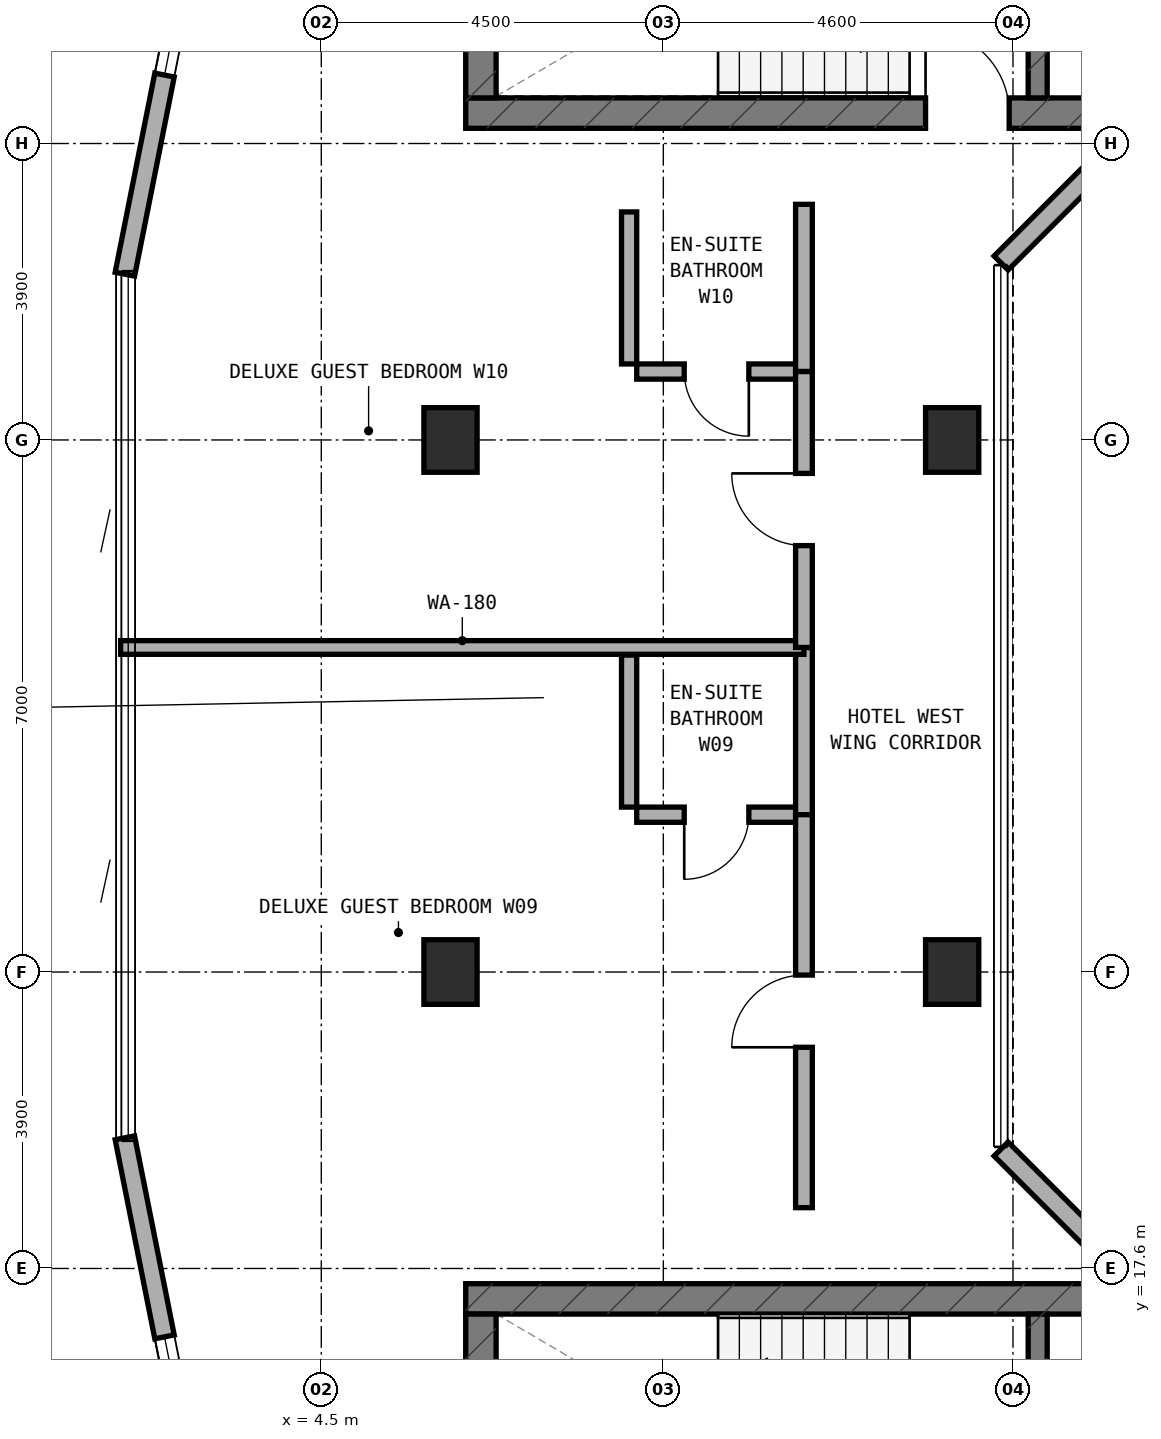
"""IFC4 building model, lengths in metres.
Left out: names, types, materials, properties, quantities, classifications, styles, units other than length and angle.
Written with IfcOpenShell. Run it as: python <this file> out.ifc"""

import sys

from ifc_helpers import new_model, si_unit, direction, frame, frame_2d, origin, origin_2d, place, context, subcontext, project, spatial, rectangle, extrude, element, fill, save


model = new_model("IFC4")
c1 = context("Model", 3, precision=1e-05, world=origin(), true_north=direction((0.0, 1.0)))
c2 = subcontext(c1, "Body", "Model", "MODEL_VIEW")
j1 = project(units=[si_unit("LENGTHUNIT", "METRE"), si_unit("PLANEANGLEUNIT", "RADIAN")], contexts=[c1])
p1 = place(None, origin())
s1 = spatial("IfcSite", under=j1, at=p1, CompositionType="ELEMENT")
p2 = place(p1, origin())
s2 = spatial("IfcBuilding", under=s1, at=p2, CompositionType="ELEMENT")
p3 = place(p2, frame((0.0, 0.0, 224.3)))
s3 = spatial("IfcBuildingStorey", under=s2, at=p3, CompositionType="ELEMENT", Elevation=224.3)
p4 = place(p3, frame((6.4, 32.8, 0.0), z_axis=(0.0, 0.0, 1.0), x_axis=(1.0, 0.0, 0.0)))
e1 = element("IfcWall", 1, at=p4, inside=s3, PredefinedType="SHEAR", context=c2, shape_type="SweptSolid", body=[
    extrude(rectangle(XDim=24.4, YDim=0.4, at=frame_2d((12.2, 0.0))), origin(), (0.0, 0.0, 1.0), 3.6),
])
p5 = place(p4, frame((6.05, 0.0, 0.0)))
e2 = element("IfcOpeningElement", 2, at=p5, cuts=e1, PredefinedType="OPENING", context=c2, shape_type="SweptSolid", body=[
    extrude(rectangle(XDim=1.1, YDim=2.15, at=frame_2d((0.55, 1.075))), frame((0.0, 0.21, 0.0), z_axis=(0.0, -1.0, 0.0), x_axis=(1.0, 0.0, 0.0)), (0.0, 0.0, 1.0), 0.42),
])
p6 = place(p3, frame((6.6, 33.0, 0.0), z_axis=(0.0, 0.0, 1.0), x_axis=(0.0, 1.0, 0.0)))
e3 = element("IfcWall", 3, at=p6, inside=s3, PredefinedType="SHEAR", context=c2, shape_type="SweptSolid", body=[
    extrude(rectangle(XDim=3.16, YDim=0.4, at=frame_2d((1.58, 0.0))), origin(), (0.0, 0.0, 1.0), 3.6),
])
p7 = place(p3, frame((13.925, 33.0, 0.0), z_axis=(0.0, 0.0, 1.0), x_axis=(0.0, 1.0, 0.0)))
e4 = element("IfcWall", 4, at=p7, inside=s3, PredefinedType="STANDARD", context=c2, shape_type="SweptSolid", body=[
    extrude(rectangle(XDim=3.16, YDim=0.25, at=frame_2d((1.58, 0.0))), origin(), (0.0, 0.0, 1.0), 3.32),
])
p8 = place(p7, frame((0.98, 0.0, 0.0)))
e5 = element("IfcOpeningElement", 5, at=p8, cuts=e4, PredefinedType="OPENING", context=c2, shape_type="SweptSolid", body=[
    extrude(rectangle(XDim=1.1, YDim=2.15, at=frame_2d((0.55, 1.075))), frame((0.0, 0.135, 0.0), z_axis=(0.0, -1.0, 0.0), x_axis=(1.0, 0.0, 0.0)), (0.0, 0.0, 1.0), 0.27),
])
p9 = place(p3, frame((6.4, 17.2, 0.0), z_axis=(0.0, 0.0, 1.0), x_axis=(1.0, 0.0, 0.0)))
e6 = element("IfcWall", 6, at=p9, inside=s3, PredefinedType="SHEAR", context=c2, shape_type="SweptSolid", body=[
    extrude(rectangle(XDim=24.4, YDim=0.4, at=frame_2d((12.2, 0.0))), origin(), (0.0, 0.0, 1.0), 3.6),
])
p10 = place(p3, frame((6.6, 13.84, 0.0), z_axis=(0.0, 0.0, 1.0), x_axis=(0.0, 1.0, 0.0)))
e7 = element("IfcWall", 7, at=p10, inside=s3, PredefinedType="SHEAR", context=c2, shape_type="SweptSolid", body=[
    extrude(rectangle(XDim=3.16, YDim=0.4, at=frame_2d((1.58, 0.0))), origin(), (0.0, 0.0, 1.0), 3.6),
])
p11 = place(p3, frame((13.925, 13.84, 0.0), z_axis=(0.0, 0.0, 1.0), x_axis=(0.0, 1.0, 0.0)))
e8 = element("IfcWall", 8, at=p11, inside=s3, PredefinedType="STANDARD", context=c2, shape_type="SweptSolid", body=[
    extrude(rectangle(XDim=3.16, YDim=0.25, at=frame_2d((1.58, 0.0))), origin(), (0.0, 0.0, 1.0), 3.32),
])
p12 = place(p11, frame((0.98, 0.0, 0.0)))
e9 = element("IfcOpeningElement", 9, at=p12, cuts=e8, PredefinedType="OPENING", context=c2, shape_type="SweptSolid", body=[
    extrude(rectangle(XDim=1.1, YDim=2.15, at=frame_2d((0.55, 1.075))), frame((0.0, 0.135, 0.0), z_axis=(0.0, -1.0, 0.0), x_axis=(1.0, 0.0, 0.0)), (0.0, 0.0, 1.0), 0.27),
])
for number, where, z_axis, x_axis in (
    (10, (6.2, 21.5, 0.0), (0.0, 0.0, 1.0), (1.0, 0.0, 0.0)),
    (11, (6.2, 28.5, 0.0), (0.0, 0.0, 1.0), (1.0, 0.0, 0.0)),
    (12, (12.8, 21.5, 0.0), (0.0, 0.0, 1.0), (1.0, 0.0, 0.0)),
    (13, (12.8, 28.5, 0.0), (0.0, 0.0, 1.0), (1.0, 0.0, 0.0)),
):
    element("IfcColumn", number, at=place(p3, frame(where, z_axis=z_axis, x_axis=x_axis)), inside=s3, PredefinedType="COLUMN", context=c2, shape_type="SweptSolid", body=[
        extrude(rectangle(XDim=0.7, YDim=0.85, at=origin_2d()), origin(), (0.0, 0.0, 1.0), 3.6),
    ])
p13 = place(p3, frame((3.629, 39.283, 0.0), z_axis=(0.0, 0.0, 1.0), x_axis=(-0.195291715883, -0.980745199176, 0.0)))
e14 = element("IfcWall", 14, at=p13, inside=s3, PredefinedType="STANDARD", context=c2, shape_type="SweptSolid", body=[
    extrude(rectangle(XDim=8.771, YDim=0.26, at=frame_2d((4.385, 0.0))), origin(), (0.0, 0.0, 1.0), 3.32),
])
p14 = place(p13, frame((4.0, 0.0, 0.85)))
e15 = element("IfcOpeningElement", 15, at=p14, cuts=e14, PredefinedType="OPENING", context=c2, shape_type="SweptSolid", body=[
    extrude(rectangle(XDim=2.1, YDim=1.5, at=frame_2d((1.05, 0.75))), frame((0.0, 0.14, 0.0), z_axis=(0.0, -1.0, 0.0), x_axis=(1.0, 0.0, 0.0)), (0.0, 0.0, 1.0), 0.28),
])
p15 = place(p3, frame((1.916, 19.319, 0.0), z_axis=(0.0, 0.0, 1.0), x_axis=(0.195291715883, -0.980745199176, 0.0)))
e16 = element("IfcWall", 16, at=p15, inside=s3, PredefinedType="STANDARD", context=c2, shape_type="SweptSolid", body=[
    extrude(rectangle(XDim=8.771, YDim=0.26, at=frame_2d((4.385, 0.0))), origin(), (0.0, 0.0, 1.0), 3.32),
])
p16 = place(p15, frame((2.67, 0.0, 0.85)))
e17 = element("IfcOpeningElement", 17, at=p16, cuts=e16, PredefinedType="OPENING", context=c2, shape_type="SweptSolid", body=[
    extrude(rectangle(XDim=2.1, YDim=1.5, at=frame_2d((1.05, 0.75))), frame((0.0, 0.14, 0.0), z_axis=(0.0, -1.0, 0.0), x_axis=(1.0, 0.0, 0.0)), (0.0, 0.0, 1.0), 0.28),
])
for number, where, z_axis, x_axis in (
    (18, (15.278, 32.662, 0.0), (0.0, 0.0, 1.0), (-0.707, -0.707, 0.0)),
    (19, (13.444, 19.172, 0.0), (0.0, 0.0, 1.0), (0.707, -0.707, 0.0)),
):
    element("IfcWall", number, at=place(p3, frame(where, z_axis=z_axis, x_axis=x_axis)), inside=s3, PredefinedType="STANDARD", context=c2, shape_type="SweptSolid", body=[
        extrude(rectangle(XDim=2.594, YDim=0.26, at=frame_2d((1.297, 0.0))), origin(), (0.0, 0.0, 1.0), 3.32),
    ])
p17 = place(p3, frame((8.65, 23.57, 0.0), z_axis=(0.0, 0.0, 1.0), x_axis=(1.0, 0.0, 0.0)))
e20 = element("IfcWall", 20, at=p17, inside=s3, PredefinedType="PLUMBINGWALL", context=c2, shape_type="SweptSolid", body=[
    extrude(rectangle(XDim=2.1, YDim=0.2, at=frame_2d((1.05, 0.0))), origin(), (0.0, 0.0, 1.0), 3.32),
])
p18 = place(p17, frame((0.625, 0.0, 0.0)))
e21 = element("IfcOpeningElement", 21, at=p18, cuts=e20, PredefinedType="OPENING", context=c2, shape_type="SweptSolid", body=[
    extrude(rectangle(XDim=0.85, YDim=2.1, at=frame_2d((0.425, 1.05))), frame((0.0, 0.11, 0.0), z_axis=(0.0, -1.0, 0.0), x_axis=(1.0, 0.0, 0.0)), (0.0, 0.0, 1.0), 0.22),
])
p19 = place(p3, frame((8.55, 23.67, 0.0), z_axis=(0.0, 0.0, 1.0), x_axis=(0.0, 1.0, 0.0)))
e22 = element("IfcWall", 22, at=p19, inside=s3, PredefinedType="PLUMBINGWALL", context=c2, shape_type="SweptSolid", body=[
    extrude(rectangle(XDim=2.0, YDim=0.2, at=frame_2d((1.0, 0.0))), origin(), (0.0, 0.0, 1.0), 3.32),
])
p20 = place(p3, frame((10.85, 23.57, 0.0), z_axis=(0.0, 0.0, 1.0), x_axis=(0.0, 1.0, 0.0)))
e23 = element("IfcWall", 23, at=p20, inside=s3, PredefinedType="SOLIDWALL", context=c2, shape_type="SweptSolid", body=[
    extrude(rectangle(XDim=2.2, YDim=0.22, at=frame_2d((1.1, 0.0))), origin(), (0.0, 0.0, 1.0), 3.32),
])
p21 = place(p3, frame((10.85, 18.4, 0.0), z_axis=(0.0, 0.0, 1.0), x_axis=(0.0, 1.0, 0.0)))
e24 = element("IfcWall", 24, at=p21, inside=s3, PredefinedType="SOLIDWALL", context=c2, shape_type="SweptSolid", body=[
    extrude(rectangle(XDim=5.17, YDim=0.22, at=frame_2d((2.585, 0.0))), origin(), (0.0, 0.0, 1.0), 2.695),
])
p22 = place(p21, frame((2.11, 0.0, 0.0)))
e25 = element("IfcOpeningElement", 25, at=p22, cuts=e24, PredefinedType="OPENING", context=c2, shape_type="SweptSolid", body=[
    extrude(rectangle(XDim=0.95, YDim=2.1, at=frame_2d((0.475, 1.05))), frame((0.0, 0.12, 0.0), z_axis=(0.0, -1.0, 0.0), x_axis=(1.0, 0.0, 0.0)), (0.0, 0.0, 1.0), 0.24),
])
p23 = place(p3, frame((1.86, 25.77, 0.0), z_axis=(0.0, 0.0, 1.0), x_axis=(1.0, 0.0, 0.0)))
e26 = element("IfcWall", 26, at=p23, inside=s3, PredefinedType="SOLIDWALL", context=c2, shape_type="SweptSolid", body=[
    extrude(rectangle(XDim=8.99, YDim=0.18, at=frame_2d((4.495, 0.0))), origin(), (0.0, 0.0, 1.0), 3.015),
])
p24 = place(p3, frame((8.65, 29.4, 0.0), z_axis=(0.0, 0.0, 1.0), x_axis=(1.0, 0.0, 0.0)))
e27 = element("IfcWall", 27, at=p24, inside=s3, PredefinedType="PLUMBINGWALL", context=c2, shape_type="SweptSolid", body=[
    extrude(rectangle(XDim=2.1, YDim=0.2, at=frame_2d((1.05, 0.0))), origin(), (0.0, 0.0, 1.0), 3.32),
])
p25 = place(p24, frame((0.625, 0.0, 0.0)))
e28 = element("IfcOpeningElement", 28, at=p25, cuts=e27, PredefinedType="OPENING", context=c2, shape_type="SweptSolid", body=[
    extrude(rectangle(XDim=0.85, YDim=2.1, at=frame_2d((0.425, 1.05))), frame((0.0, 0.11, 0.0), z_axis=(0.0, -1.0, 0.0), x_axis=(1.0, 0.0, 0.0)), (0.0, 0.0, 1.0), 0.22),
])
p26 = place(p3, frame((8.55, 29.5, 0.0), z_axis=(0.0, 0.0, 1.0), x_axis=(0.0, 1.0, 0.0)))
e29 = element("IfcWall", 29, at=p26, inside=s3, PredefinedType="PLUMBINGWALL", context=c2, shape_type="SweptSolid", body=[
    extrude(rectangle(XDim=2.0, YDim=0.2, at=frame_2d((1.0, 0.0))), origin(), (0.0, 0.0, 1.0), 3.32),
])
p27 = place(p3, frame((10.85, 29.4, 0.0), z_axis=(0.0, 0.0, 1.0), x_axis=(0.0, 1.0, 0.0)))
e30 = element("IfcWall", 30, at=p27, inside=s3, PredefinedType="SOLIDWALL", context=c2, shape_type="SweptSolid", body=[
    extrude(rectangle(XDim=2.2, YDim=0.22, at=frame_2d((1.1, 0.0))), origin(), (0.0, 0.0, 1.0), 3.32),
])
p28 = place(p3, frame((10.85, 25.77, 0.0), z_axis=(0.0, 0.0, 1.0), x_axis=(0.0, 1.0, 0.0)))
e31 = element("IfcWall", 31, at=p28, inside=s3, PredefinedType="SOLIDWALL", context=c2, shape_type="SweptSolid", body=[
    extrude(rectangle(XDim=3.63, YDim=0.22, at=frame_2d((1.815, 0.0))), origin(), (0.0, 0.0, 1.0), 2.695),
])
p29 = place(p28, frame((1.34, 0.0, 0.0)))
e32 = element("IfcOpeningElement", 32, at=p29, cuts=e31, PredefinedType="OPENING", context=c2, shape_type="SweptSolid", body=[
    extrude(rectangle(XDim=0.95, YDim=2.1, at=frame_2d((0.475, 1.05))), frame((0.0, 0.12, 0.0), z_axis=(0.0, -1.0, 0.0), x_axis=(1.0, 0.0, 0.0)), (0.0, 0.0, 1.0), 0.24),
])
p30 = place(p14, origin())
e33 = element("IfcWindow", 33, at=p30, inside=s3, PartitioningType="SINGLE_PANEL", PredefinedType="WINDOW", context=c2, shape_type="SweptSolid", body=[
    extrude(rectangle(XDim=2.1, YDim=1.5, at=frame_2d((1.05, 0.75))), frame((0.0, 0.03, 0.0), z_axis=(0.0, -1.0, 0.0), x_axis=(1.0, 0.0, 0.0)), (0.0, 0.0, 1.0), 0.06),
])
fill(e15, e33)
p31 = place(p16, origin())
e34 = element("IfcWindow", 34, at=p31, inside=s3, PartitioningType="SINGLE_PANEL", PredefinedType="WINDOW", context=c2, shape_type="SweptSolid", body=[
    extrude(rectangle(XDim=2.1, YDim=1.5, at=frame_2d((1.05, 0.75))), frame((0.0, 0.03, 0.0), z_axis=(0.0, -1.0, 0.0), x_axis=(1.0, 0.0, 0.0)), (0.0, 0.0, 1.0), 0.06),
])
fill(e17, e34)
p32 = place(p5, origin())
e35 = element("IfcDoor", 35, at=p32, inside=s3, OperationType="SINGLE_SWING_LEFT", PredefinedType="DOOR", context=c2, shape_type="SweptSolid", body=[
    extrude(rectangle(XDim=1.1, YDim=2.15, at=frame_2d((0.55, 1.075))), frame((0.0, 0.025, 0.0), z_axis=(0.0, -1.0, 0.0), x_axis=(1.0, 0.0, 0.0)), (0.0, 0.0, 1.0), 0.05),
])
fill(e2, e35)
p33 = place(p18, frame((0.85, 0.0, 0.0), z_axis=(0.0, 0.0, 1.0), x_axis=(-1.0, 0.0, 0.0)))
e36 = element("IfcDoor", 36, at=p33, inside=s3, OperationType="SINGLE_SWING_RIGHT", PredefinedType="DOOR", context=c2, shape_type="SweptSolid", body=[
    extrude(rectangle(XDim=0.85, YDim=2.1, at=frame_2d((0.425, 1.05))), frame((0.0, 0.025, 0.0), z_axis=(0.0, -1.0, 0.0), x_axis=(1.0, 0.0, 0.0)), (0.0, 0.0, 1.0), 0.05),
])
fill(e21, e36)
p34 = place(p22, origin())
e37 = element("IfcDoor", 37, at=p34, inside=s3, OperationType="SINGLE_SWING_LEFT", PredefinedType="DOOR", context=c2, shape_type="SweptSolid", body=[
    extrude(rectangle(XDim=0.95, YDim=2.1, at=frame_2d((0.475, 1.05))), frame((0.0, 0.025, 0.0), z_axis=(0.0, -1.0, 0.0), x_axis=(1.0, 0.0, 0.0)), (0.0, 0.0, 1.0), 0.05),
])
fill(e25, e37)
p35 = place(p25, frame((0.85, 0.0, 0.0), z_axis=(0.0, 0.0, 1.0), x_axis=(-1.0, 0.0, 0.0)))
e38 = element("IfcDoor", 38, at=p35, inside=s3, OperationType="SINGLE_SWING_LEFT", PredefinedType="DOOR", context=c2, shape_type="SweptSolid", body=[
    extrude(rectangle(XDim=0.85, YDim=2.1, at=frame_2d((0.425, 1.05))), frame((0.0, 0.025, 0.0), z_axis=(0.0, -1.0, 0.0), x_axis=(1.0, 0.0, 0.0)), (0.0, 0.0, 1.0), 0.05),
])
fill(e28, e38)
p36 = place(p29, origin())
e39 = element("IfcDoor", 39, at=p36, inside=s3, OperationType="SINGLE_SWING_RIGHT", PredefinedType="DOOR", context=c2, shape_type="SweptSolid", body=[
    extrude(rectangle(XDim=0.95, YDim=2.1, at=frame_2d((0.475, 1.05))), frame((0.0, 0.025, 0.0), z_axis=(0.0, -1.0, 0.0), x_axis=(1.0, 0.0, 0.0)), (0.0, 0.0, 1.0), 0.05),
])
fill(e32, e39)
save(model, sys.argv[1])
